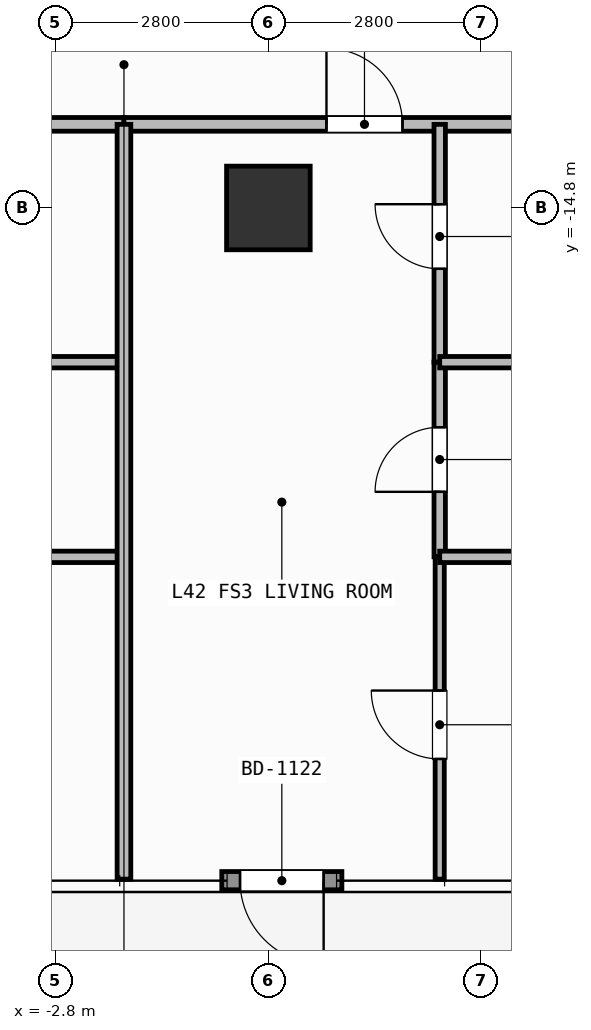
"""IFC4 building model, lengths in metres.
Left out: names, types, materials, properties, quantities, classifications, styles, units other than length and angle.
Written with IfcOpenShell. Run it as: python <this file> out.ifc"""

import sys

from ifc_helpers import new_model, si_unit, direction, frame, frame_2d, origin, origin_2d, place, context, subcontext, project, spatial, rectangle, extrude, element, fill, save


model = new_model("IFC4")
c1 = context("Model", 3, precision=1e-05, world=origin(), true_north=direction((0.0, 1.0)))
c2 = subcontext(c1, "Body", "Model", "MODEL_VIEW")
j1 = project(units=[si_unit("LENGTHUNIT", "METRE"), si_unit("PLANEANGLEUNIT", "RADIAN")], contexts=[c1])
p1 = place(None, origin())
s1 = spatial("IfcSite", under=j1, at=p1, CompositionType="ELEMENT")
p2 = place(p1, origin())
s2 = spatial("IfcBuilding", under=s1, at=p2, CompositionType="ELEMENT")
p3 = place(p2, frame((0.0, 0.0, 171.9)))
s3 = spatial("IfcBuildingStorey", under=s2, at=p3, CompositionType="ELEMENT", Elevation=171.9)
p4 = place(p3, frame((0.0, -14.8, 0.0), z_axis=(0.0, 0.0, 1.0), x_axis=(1.0, 0.0, 0.0)))
e1 = element("IfcColumn", 1, at=p4, inside=s3, PredefinedType="COLUMN", context=c2, shape_type="SweptSolid", body=[
    extrude(rectangle(XDim=1.1, YDim=1.1, at=origin_2d()), origin(), (0.0, 0.0, 1.0), 3.9),
])
p5 = place(p3, frame((0.967, -23.65, 0.0), z_axis=(0.0, 0.0, 1.0), x_axis=(-1.0, 0.0, 0.0)))
e2 = element("IfcWall", 2, at=p5, inside=s3, PredefinedType="SOLIDWALL", context=c2, shape_type="SweptSolid", body=[
    extrude(rectangle(XDim=1.58, YDim=0.24, at=frame_2d((0.79, 0.0))), origin(), (0.0, 0.0, 1.0), 3.68),
])
p6 = place(p5, frame((0.24, 0.0, 0.0)))
e3 = element("IfcOpeningElement", 3, at=p6, cuts=e2, PredefinedType="OPENING", context=c2, shape_type="SweptSolid", body=[
    extrude(rectangle(XDim=1.1, YDim=2.2, at=frame_2d((0.55, 1.1))), frame((0.0, 0.13, 0.0), z_axis=(0.0, -1.0, 0.0), x_axis=(1.0, 0.0, 0.0)), (0.0, 0.0, 1.0), 0.26),
])
p7 = place(p3, frame((-8.775, -13.7, 0.0), z_axis=(0.0, 0.0, 1.0), x_axis=(1.0, 0.0, 0.0)))
e4 = element("IfcWall", 4, at=p7, inside=s3, PredefinedType="PARTITIONING", context=c2, shape_type="SweptSolid", body=[
    extrude(rectangle(XDim=6.875, YDim=0.18, at=frame_2d((3.438, 0.0))), origin(), (0.0, 0.0, 1.0), 3.68),
])
p8 = place(p7, frame((2.131, 0.0, 0.0)))
e5 = element("IfcOpeningElement", 5, at=p8, cuts=e4, PredefinedType="OPENING", context=c2, shape_type="SweptSolid", body=[
    extrude(rectangle(XDim=1.0, YDim=2.2, at=frame_2d((0.5, 1.1))), frame((0.0, 0.1, 0.0), z_axis=(0.0, -1.0, 0.0), x_axis=(1.0, 0.0, 0.0)), (0.0, 0.0, 1.0), 0.2),
])
p9 = place(p3, frame((-1.9, -13.7, 0.0), z_axis=(0.0, 0.0, 1.0), x_axis=(1.0, 0.0, 0.0)))
e6 = element("IfcWall", 6, at=p9, inside=s3, PredefinedType="PARTITIONING", context=c2, shape_type="SweptSolid", body=[
    extrude(rectangle(XDim=8.654, YDim=0.18, at=frame_2d((4.327, 0.0))), origin(), (0.0, 0.0, 1.0), 3.68),
])
p10 = place(p9, frame((2.664, 0.0, 0.0)))
e7 = element("IfcOpeningElement", 7, at=p10, cuts=e6, PredefinedType="OPENING", context=c2, shape_type="SweptSolid", body=[
    extrude(rectangle(XDim=1.0, YDim=2.2, at=frame_2d((0.5, 1.1))), frame((0.0, 0.1, 0.0), z_axis=(0.0, -1.0, 0.0), x_axis=(1.0, 0.0, 0.0)), (0.0, 0.0, 1.0), 0.2),
])
p11 = place(p3, frame((2.254, -16.829, 0.0), z_axis=(0.0, 0.0, 1.0), x_axis=(0.0, 1.0, 0.0)))
e8 = element("IfcWall", 8, at=p11, inside=s3, PredefinedType="PARTITIONING", context=c2, shape_type="SweptSolid", body=[
    extrude(rectangle(XDim=3.129, YDim=0.15, at=frame_2d((1.564, 0.0))), origin(), (0.0, 0.0, 1.0), 3.68),
])
p12 = place(p11, frame((1.229, 0.0, 0.0)))
e9 = element("IfcOpeningElement", 9, at=p12, cuts=e8, PredefinedType="OPENING", context=c2, shape_type="SweptSolid", body=[
    extrude(rectangle(XDim=0.85, YDim=2.1, at=frame_2d((0.425, 1.05))), frame((0.0, 0.085, 0.0), z_axis=(0.0, -1.0, 0.0), x_axis=(1.0, 0.0, 0.0)), (0.0, 0.0, 1.0), 0.17),
])
p13 = place(p3, frame((2.254, -19.39, 0.0), z_axis=(0.0, 0.0, 1.0), x_axis=(0.0, 1.0, 0.0)))
e10 = element("IfcWall", 10, at=p13, inside=s3, PredefinedType="PARTITIONING", context=c2, shape_type="SweptSolid", body=[
    extrude(rectangle(XDim=2.561, YDim=0.15, at=frame_2d((1.28, 0.0))), origin(), (0.0, 0.0, 1.0), 3.68),
])
p14 = place(p13, frame((0.855, 0.0, 0.0)))
e11 = element("IfcOpeningElement", 11, at=p14, cuts=e10, PredefinedType="OPENING", context=c2, shape_type="SweptSolid", body=[
    extrude(rectangle(XDim=0.85, YDim=2.1, at=frame_2d((0.425, 1.05))), frame((0.0, 0.085, 0.0), z_axis=(0.0, -1.0, 0.0), x_axis=(1.0, 0.0, 0.0)), (0.0, 0.0, 1.0), 0.17),
])
p15 = place(p3, frame((2.254, -23.63, 0.0), z_axis=(0.0, 0.0, 1.0), x_axis=(0.0, 1.0, 0.0)))
e12 = element("IfcWall", 12, at=p15, inside=s3, PredefinedType="PARTITIONING", context=c2, shape_type="SweptSolid", body=[
    extrude(rectangle(XDim=4.24, YDim=0.12, at=frame_2d((2.12, 0.0))), origin(), (0.0, 0.0, 1.0), 3.68),
])
p16 = place(p15, frame((1.581, 0.0, 0.0)))
e13 = element("IfcOpeningElement", 13, at=p16, cuts=e12, PredefinedType="OPENING", context=c2, shape_type="SweptSolid", body=[
    extrude(rectangle(XDim=0.9, YDim=2.1, at=frame_2d((0.45, 1.05))), frame((0.0, 0.07, 0.0), z_axis=(0.0, -1.0, 0.0), x_axis=(1.0, 0.0, 0.0)), (0.0, 0.0, 1.0), 0.14),
])
p17 = place(p3, frame((-5.414, -16.829, 0.0), z_axis=(0.0, 0.0, 1.0), x_axis=(1.0, 0.0, 0.0)))
e14 = element("IfcWall", 14, at=p17, inside=s3, PredefinedType="PARTITIONING", context=c2, shape_type="SweptSolid", body=[
    extrude(rectangle(XDim=3.514, YDim=0.15, at=frame_2d((1.757, 0.0))), origin(), (0.0, 0.0, 1.0), 3.082),
])
p18 = place(p3, frame((-5.414, -19.39, 0.0), z_axis=(0.0, 0.0, 1.0), x_axis=(1.0, 0.0, 0.0)))
e15 = element("IfcWall", 15, at=p18, inside=s3, PredefinedType="PARTITIONING", context=c2, shape_type="SweptSolid", body=[
    extrude(rectangle(XDim=3.514, YDim=0.15, at=frame_2d((1.757, 0.0))), origin(), (0.0, 0.0, 1.0), 3.68),
])
p19 = place(p3, frame((2.254, -16.829, 0.0), z_axis=(0.0, 0.0, 1.0), x_axis=(1.0, 0.0, 0.0)))
e16 = element("IfcWall", 16, at=p19, inside=s3, PredefinedType="PARTITIONING", context=c2, shape_type="SweptSolid", body=[
    extrude(rectangle(XDim=4.5, YDim=0.15, at=frame_2d((2.25, 0.0))), origin(), (0.0, 0.0, 1.0), 3.082),
])
p20 = place(p3, frame((2.254, -19.39, 0.0), z_axis=(0.0, 0.0, 1.0), x_axis=(1.0, 0.0, 0.0)))
e17 = element("IfcWall", 17, at=p20, inside=s3, PredefinedType="PARTITIONING", context=c2, shape_type="SweptSolid", body=[
    extrude(rectangle(XDim=4.5, YDim=0.15, at=frame_2d((2.25, 0.0))), origin(), (0.0, 0.0, 1.0), 3.68),
])
p21 = place(p3, frame((-1.9, -23.63, 0.0), z_axis=(0.0, 0.0, 1.0), x_axis=(0.0, 1.0, 0.0)))
e18 = element("IfcWall", 18, at=p21, inside=s3, PredefinedType="PARTITIONING", context=c2, shape_type="SweptSolid", body=[
    extrude(rectangle(XDim=9.93, YDim=0.18, at=frame_2d((4.965, 0.0))), origin(), (0.0, 0.0, 1.0), 3.68),
])
p22 = place(p6, origin())
e19 = element("IfcDoor", 19, at=p22, inside=s3, OperationType="SINGLE_SWING_LEFT", PredefinedType="DOOR", context=c2, shape_type="SweptSolid", body=[
    extrude(rectangle(XDim=1.1, YDim=2.2, at=frame_2d((0.55, 1.1))), frame((0.0, 0.025, 0.0), z_axis=(0.0, -1.0, 0.0), x_axis=(1.0, 0.0, 0.0)), (0.0, 0.0, 1.0), 0.05),
])
fill(e3, e19)
p23 = place(p10, origin())
e20 = element("IfcDoor", 20, at=p23, inside=s3, OperationType="SINGLE_SWING_LEFT", PredefinedType="DOOR", context=c2, shape_type="SweptSolid", body=[
    extrude(rectangle(XDim=1.0, YDim=2.2, at=frame_2d((0.5, 1.1))), frame((0.0, 0.025, 0.0), z_axis=(0.0, -1.0, 0.0), x_axis=(1.0, 0.0, 0.0)), (0.0, 0.0, 1.0), 0.05),
])
fill(e7, e20)
p24 = place(p12, origin())
e21 = element("IfcDoor", 21, at=p24, inside=s3, OperationType="SINGLE_SWING_RIGHT", PredefinedType="DOOR", context=c2, shape_type="SweptSolid", body=[
    extrude(rectangle(XDim=0.85, YDim=2.1, at=frame_2d((0.425, 1.05))), frame((0.0, 0.025, 0.0), z_axis=(0.0, -1.0, 0.0), x_axis=(1.0, 0.0, 0.0)), (0.0, 0.0, 1.0), 0.05),
])
fill(e9, e21)
p25 = place(p14, origin())
e22 = element("IfcDoor", 22, at=p25, inside=s3, OperationType="SINGLE_SWING_LEFT", PredefinedType="DOOR", context=c2, shape_type="SweptSolid", body=[
    extrude(rectangle(XDim=0.85, YDim=2.1, at=frame_2d((0.425, 1.05))), frame((0.0, 0.025, 0.0), z_axis=(0.0, -1.0, 0.0), x_axis=(1.0, 0.0, 0.0)), (0.0, 0.0, 1.0), 0.05),
])
fill(e11, e22)
p26 = place(p16, origin())
e23 = element("IfcDoor", 23, at=p26, inside=s3, OperationType="SINGLE_SWING_RIGHT", PredefinedType="DOOR", context=c2, shape_type="SweptSolid", body=[
    extrude(rectangle(XDim=0.9, YDim=2.1, at=frame_2d((0.45, 1.05))), frame((0.0, 0.025, 0.0), z_axis=(0.0, -1.0, 0.0), x_axis=(1.0, 0.0, 0.0)), (0.0, 0.0, 1.0), 0.05),
])
fill(e13, e23)
save(model, sys.argv[1])
